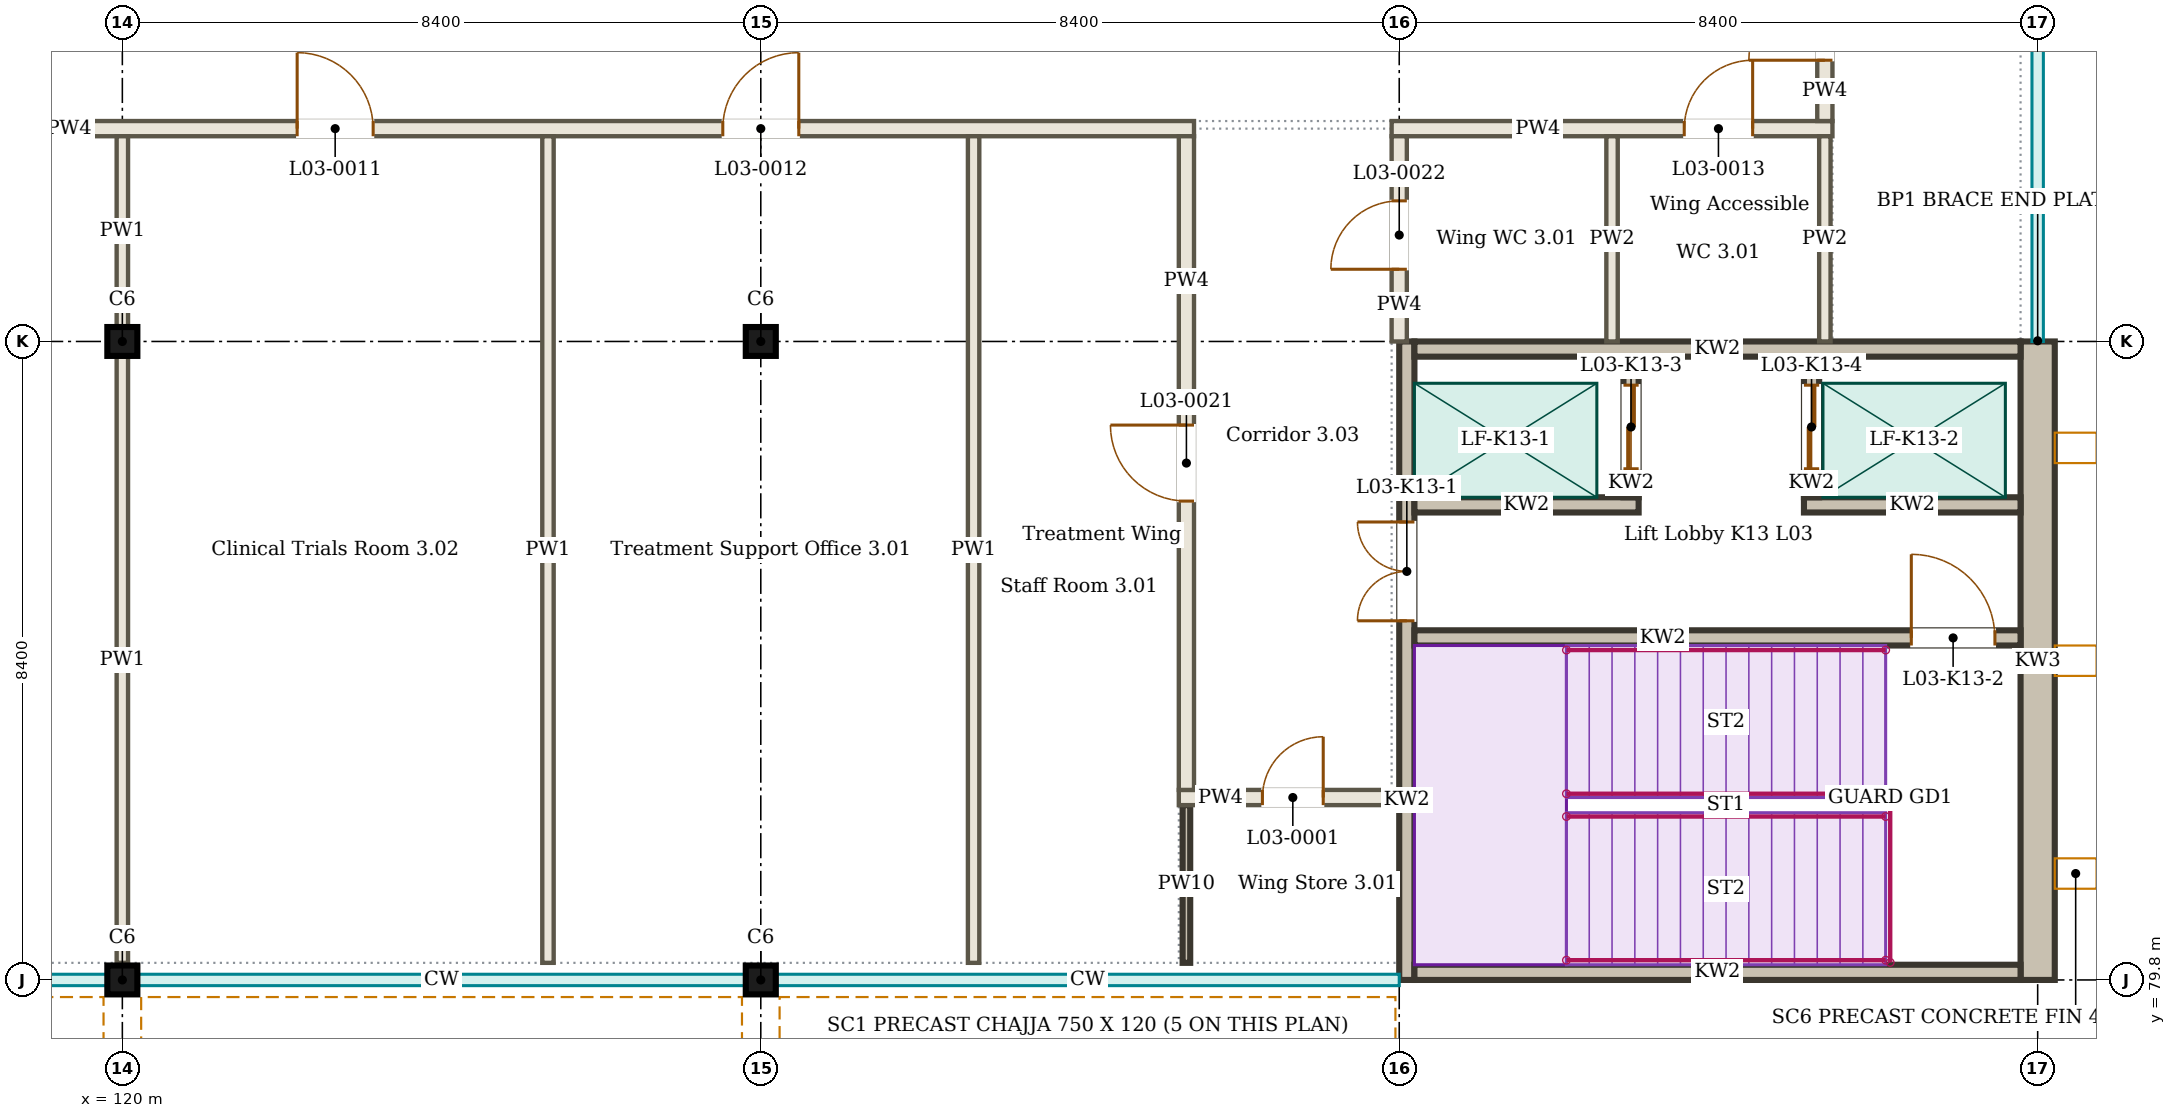
"""IFC4 building model, lengths in metres.
Left out: names, types, materials, properties, quantities, classifications, styles, units other than length and angle.
Written with IfcOpenShell. Run it as: python <this file> out.ifc"""

import sys

from ifc_helpers import new_model, si_unit, direction, frame, frame_2d, origin, origin_2d, place, context, subcontext, project, spatial, rectangle, i_section, extrude, element, fill, save


model = new_model("IFC4")
c1 = context("Model", 3, precision=1e-05, world=origin(), true_north=direction((0.0, 1.0)))
c2 = subcontext(c1, "Body", "Model", "MODEL_VIEW")
j1 = project(units=[si_unit("LENGTHUNIT", "METRE"), si_unit("PLANEANGLEUNIT", "RADIAN")], contexts=[c1])
p1 = place(None, origin())
s1 = spatial("IfcSite", under=j1, at=p1, CompositionType="ELEMENT")
p2 = place(p1, origin())
s2 = spatial("IfcBuilding", under=s1, at=p2, CompositionType="ELEMENT")
p3 = place(p2, frame((0.0, 0.0, 13.5)))
s3 = spatial("IfcBuildingStorey", under=s2, at=p3, CompositionType="ELEMENT", Elevation=13.5)
for number, where, z_axis, x_axis in (
    (1, (120.0, 79.8, 0.0), (0.0, 0.0, 1.0), (1.0, 0.0, 0.0)),
    (2, (128.4, 79.8, 0.0), (0.0, 0.0, 1.0), (1.0, 0.0, 0.0)),
    (3, (120.0, 88.2, 0.0), (0.0, 0.0, 1.0), (1.0, 0.0, 0.0)),
    (4, (128.4, 88.2, 0.0), (0.0, 0.0, 1.0), (1.0, 0.0, 0.0)),
):
    element("IfcColumn", number, at=place(p3, frame(where, z_axis=z_axis, x_axis=x_axis)), inside=s3, PredefinedType="COLUMN", context=c2, shape_type="SweptSolid", body=[
        extrude(i_section(OverallWidth=0.395, OverallDepth=0.38, WebThickness=0.019, FlangeThickness=0.03, FilletRadius=0.027, at=origin_2d()), origin(), (0.0, 0.0, 1.0), 4.5),
    ])
for number, where, z_axis, x_axis in (
    (5, (111.798, 79.64, 3.87), (0.0, 0.0, 1.0), (1.0, 0.0, 0.0)),
    (6, (120.198, 79.64, 3.87), (0.0, 0.0, 1.0), (1.0, 0.0, 0.0)),
):
    element("IfcWall", number, at=place(p3, frame(where, z_axis=z_axis, x_axis=x_axis)), inside=s3, PredefinedType="SOLIDWALL", context=c2, shape_type="SweptSolid", body=[
        extrude(rectangle(XDim=8.005, YDim=0.13, at=frame_2d((4.002, 0.0))), origin(), (0.0, 0.0, 1.0), 0.63),
    ])
p4 = place(p3, frame((128.597, 79.64, 3.87), z_axis=(0.0, 0.0, 1.0), x_axis=(1.0, 0.0, 0.0)))
e7 = element("IfcWall", 7, at=p4, inside=s3, PredefinedType="SOLIDWALL", context=c2, shape_type="SweptSolid", body=[
    extrude(rectangle(XDim=8.203, YDim=0.13, at=frame_2d((4.101, 0.0))), origin(), (0.0, 0.0, 1.0), 0.63),
])
p5 = place(p3, frame((133.9, 82.2, 0.0), z_axis=(0.0, 0.0, 1.0), x_axis=(1.0, 0.0, 0.0)))
e8 = element("IfcWall", 8, at=p5, inside=s3, PredefinedType="PARTITIONING", context=c2, shape_type="SweptSolid", body=[
    extrude(rectangle(XDim=2.9, YDim=0.2, at=frame_2d((1.45, 0.0))), origin(), (0.0, 0.0, 1.0), 3.95),
])
p6 = place(p5, frame((1.1, 0.0, 0.0)))
e9 = element("IfcOpeningElement", 9, at=p6, cuts=e8, PredefinedType="OPENING", context=c2, shape_type="SweptSolid", body=[
    extrude(rectangle(XDim=0.8, YDim=2.1, at=frame_2d((0.4, 1.05))), frame((0.0, 0.11, 0.0), z_axis=(0.0, -1.0, 0.0), x_axis=(1.0, 0.0, 0.0)), (0.0, 0.0, 1.0), 0.22),
])
p7 = place(p3, frame((111.825, 91.0, 0.0), z_axis=(0.0, 0.0, 1.0), x_axis=(1.0, 0.0, 0.0)))
e10 = element("IfcWall", 10, at=p7, inside=s3, PredefinedType="PARTITIONING", context=c2, shape_type="SweptSolid", body=[
    extrude(rectangle(XDim=22.275, YDim=0.2, at=frame_2d((11.138, 0.0))), origin(), (0.0, 0.0, 1.0), 3.8),
])
p8 = place(p7, frame((3.475, 0.0, 0.0)))
e11 = element("IfcOpeningElement", 11, at=p8, cuts=e10, PredefinedType="OPENING", context=c2, shape_type="SweptSolid", body=[
    extrude(rectangle(XDim=1.0, YDim=2.1, at=frame_2d((0.5, 1.05))), frame((0.0, 0.11, 0.0), z_axis=(0.0, -1.0, 0.0), x_axis=(1.0, 0.0, 0.0)), (0.0, 0.0, 1.0), 0.22),
])
p9 = place(p7, frame((10.475, 0.0, 0.0)))
e12 = element("IfcOpeningElement", 12, at=p9, cuts=e10, PredefinedType="OPENING", context=c2, shape_type="SweptSolid", body=[
    extrude(rectangle(XDim=1.0, YDim=2.1, at=frame_2d((0.5, 1.05))), frame((0.0, 0.11, 0.0), z_axis=(0.0, -1.0, 0.0), x_axis=(1.0, 0.0, 0.0)), (0.0, 0.0, 1.0), 0.22),
])
p10 = place(p7, frame((16.075, 0.0, 0.0)))
e13 = element("IfcOpeningElement", 13, at=p10, cuts=e10, PredefinedType="OPENING", context=c2, shape_type="SweptSolid", body=[
    extrude(rectangle(XDim=1.0, YDim=2.1, at=frame_2d((0.5, 1.05))), frame((0.0, 0.11, 0.0), z_axis=(0.0, -1.0, 0.0), x_axis=(1.0, 0.0, 0.0)), (0.0, 0.0, 1.0), 0.22),
])
p11 = place(p3, frame((136.7, 91.0, 0.0), z_axis=(0.0, 0.0, 1.0), x_axis=(1.0, 0.0, 0.0)))
e14 = element("IfcWall", 14, at=p11, inside=s3, PredefinedType="PARTITIONING", context=c2, shape_type="SweptSolid", body=[
    extrude(rectangle(XDim=5.8, YDim=0.2, at=frame_2d((2.9, 0.0))), origin(), (0.0, 0.0, 1.0), 3.8),
])
p12 = place(p11, frame((3.85, 0.0, 0.0)))
e15 = element("IfcOpeningElement", 15, at=p12, cuts=e14, PredefinedType="OPENING", context=c2, shape_type="SweptSolid", body=[
    extrude(rectangle(XDim=0.9, YDim=2.1, at=frame_2d((0.45, 1.05))), frame((0.0, 0.11, 0.0), z_axis=(0.0, -1.0, 0.0), x_axis=(1.0, 0.0, 0.0)), (0.0, 0.0, 1.0), 0.22),
])
p13 = place(p3, frame((120.0, 80.025, 0.0), z_axis=(0.0, 0.0, 1.0), x_axis=(0.0, 1.0, 0.0)))
e16 = element("IfcWall", 16, at=p13, inside=s3, PredefinedType="PARTITIONING", context=c2, shape_type="SweptSolid", body=[
    extrude(rectangle(XDim=7.978, YDim=0.15, at=frame_2d((3.989, 0.0))), origin(), (0.0, 0.0, 1.0), 3.8),
])
p14 = place(p3, frame((120.0, 88.397, 0.0), z_axis=(0.0, 0.0, 1.0), x_axis=(0.0, 1.0, 0.0)))
e17 = element("IfcWall", 17, at=p14, inside=s3, PredefinedType="PARTITIONING", context=c2, shape_type="SweptSolid", body=[
    extrude(rectangle(XDim=2.502, YDim=0.15, at=frame_2d((1.251, 0.0))), origin(), (0.0, 0.0, 1.0), 3.8),
])
for number, where, z_axis, x_axis in (
    (18, (125.6, 80.025, 0.0), (0.0, 0.0, 1.0), (0.0, 1.0, 0.0)),
    (19, (131.2, 80.025, 0.0), (0.0, 0.0, 1.0), (0.0, 1.0, 0.0)),
):
    element("IfcWall", number, at=place(p3, frame(where, z_axis=z_axis, x_axis=x_axis)), inside=s3, PredefinedType="PARTITIONING", context=c2, shape_type="SweptSolid", body=[
        extrude(rectangle(XDim=10.875, YDim=0.15, at=frame_2d((5.438, 0.0))), origin(), (0.0, 0.0, 1.0), 3.8),
    ])
p15 = place(p3, frame((134.0, 80.025, 0.0), z_axis=(0.0, 0.0, 1.0), x_axis=(0.0, 1.0, 0.0)))
e20 = element("IfcWall", 20, at=p15, inside=s3, PredefinedType="SOLIDWALL", context=c2, shape_type="SweptSolid", body=[
    extrude(rectangle(XDim=2.075, YDim=0.1, at=frame_2d((1.038, 0.0))), origin(), (0.0, 0.0, 1.0), 3.95),
])
p16 = place(p3, frame((134.0, 82.3, 0.0), z_axis=(0.0, 0.0, 1.0), x_axis=(0.0, 1.0, 0.0)))
e21 = element("IfcWall", 21, at=p16, inside=s3, PredefinedType="PARTITIONING", context=c2, shape_type="SweptSolid", body=[
    extrude(rectangle(XDim=8.6, YDim=0.2, at=frame_2d((4.3, 0.0))), origin(), (0.0, 0.0, 1.0), 3.8),
])
p17 = place(p16, frame((3.8, 0.0, 0.0)))
e22 = element("IfcOpeningElement", 22, at=p17, cuts=e21, PredefinedType="OPENING", context=c2, shape_type="SweptSolid", body=[
    extrude(rectangle(XDim=1.0, YDim=2.1, at=frame_2d((0.5, 1.05))), frame((0.0, 0.11, 0.0), z_axis=(0.0, -1.0, 0.0), x_axis=(1.0, 0.0, 0.0)), (0.0, 0.0, 1.0), 0.22),
])
p18 = place(p3, frame((136.8, 88.2, 0.0), z_axis=(0.0, 0.0, 1.0), x_axis=(0.0, 1.0, 0.0)))
e23 = element("IfcWall", 23, at=p18, inside=s3, PredefinedType="PARTITIONING", context=c2, shape_type="SweptSolid", body=[
    extrude(rectangle(XDim=2.7, YDim=0.2, at=frame_2d((1.35, 0.0))), origin(), (0.0, 0.0, 1.0), 3.8),
])
p19 = place(p18, frame((0.95, 0.0, 0.0)))
e24 = element("IfcOpeningElement", 24, at=p19, cuts=e23, PredefinedType="OPENING", context=c2, shape_type="SweptSolid", body=[
    extrude(rectangle(XDim=0.9, YDim=2.1, at=frame_2d((0.45, 1.05))), frame((0.0, 0.11, 0.0), z_axis=(0.0, -1.0, 0.0), x_axis=(1.0, 0.0, 0.0)), (0.0, 0.0, 1.0), 0.22),
])
for number, where, z_axis, x_axis in (
    (25, (139.6, 88.2, 0.0), (0.0, 0.0, 1.0), (0.0, 1.0, 0.0)),
    (26, (142.4, 88.2, 0.0), (0.0, 0.0, 1.0), (0.0, 1.0, 0.0)),
):
    element("IfcWall", number, at=place(p3, frame(where, z_axis=z_axis, x_axis=x_axis)), inside=s3, PredefinedType="PARTITIONING", context=c2, shape_type="SweptSolid", body=[
        extrude(rectangle(XDim=2.7, YDim=0.15, at=frame_2d((1.35, 0.0))), origin(), (0.0, 0.0, 1.0), 3.95),
    ])
p20 = place(p3, frame((142.4, 91.1, 0.0), z_axis=(0.0, 0.0, 1.0), x_axis=(0.0, 1.0, 0.0)))
e27 = element("IfcWall", 27, at=p20, inside=s3, PredefinedType="PARTITIONING", context=c2, shape_type="SweptSolid", body=[
    extrude(rectangle(XDim=2.6, YDim=0.2, at=frame_2d((1.3, 0.0))), origin(), (0.0, 0.0, 1.0), 3.95),
])
p21 = place(p20, frame((0.8, 0.0, 0.0)))
e28 = element("IfcOpeningElement", 28, at=p21, cuts=e27, PredefinedType="OPENING", context=c2, shape_type="SweptSolid", body=[
    extrude(rectangle(XDim=1.0, YDim=2.1, at=frame_2d((0.5, 1.05))), frame((0.0, 0.11, 0.0), z_axis=(0.0, -1.0, 0.0), x_axis=(1.0, 0.0, 0.0)), (0.0, 0.0, 1.0), 0.22),
])
p22 = place(p3, frame((136.9, 79.8, 0.0), z_axis=(0.0, 0.0, 1.0), x_axis=(0.0, 1.0, 0.0)))
e29 = element("IfcWall", 29, at=p22, inside=s3, PredefinedType="SOLIDWALL", context=c2, shape_type="SweptSolid", body=[
    extrude(rectangle(XDim=8.4, YDim=0.2, at=frame_2d((4.2, 0.0))), origin(), (0.0, 0.0, 1.0), 4.5),
])
p23 = place(p22, frame((4.725, 0.0, 0.0)))
e30 = element("IfcOpeningElement", 30, at=p23, cuts=e29, PredefinedType="OPENING", context=c2, shape_type="SweptSolid", body=[
    extrude(rectangle(XDim=1.3, YDim=2.1, at=frame_2d((0.65, 1.05))), frame((0.0, 0.11, 0.0), z_axis=(0.0, -1.0, 0.0), x_axis=(1.0, 0.0, 0.0)), (0.0, 0.0, 1.0), 0.22),
])
p24 = place(p3, frame((145.2, 79.8, 0.0), z_axis=(0.0, 0.0, 1.0), x_axis=(0.0, 1.0, 0.0)))
e31 = element("IfcWall", 31, at=p24, inside=s3, PredefinedType="SOLIDWALL", context=c2, shape_type="SweptSolid", body=[
    extrude(rectangle(XDim=8.4, YDim=0.45, at=frame_2d((4.2, 0.0))), origin(), (0.0, 0.0, 1.0), 4.5),
])
for number, where, z_axis, x_axis in (
    (32, (137.0, 79.9, 0.0), (0.0, 0.0, 1.0), (1.0, 0.0, 0.0)),
    (33, (137.0, 88.1, 0.0), (0.0, 0.0, 1.0), (1.0, 0.0, 0.0)),
):
    element("IfcWall", number, at=place(p3, frame(where, z_axis=z_axis, x_axis=x_axis)), inside=s3, PredefinedType="SOLIDWALL", context=c2, shape_type="SweptSolid", body=[
        extrude(rectangle(XDim=7.975, YDim=0.2, at=frame_2d((3.988, 0.0))), origin(), (0.0, 0.0, 1.0), 4.5),
    ])
p25 = place(p3, frame((137.0, 84.3, 0.0), z_axis=(0.0, 0.0, 1.0), x_axis=(1.0, 0.0, 0.0)))
e34 = element("IfcWall", 34, at=p25, inside=s3, PredefinedType="SOLIDWALL", context=c2, shape_type="SweptSolid", body=[
    extrude(rectangle(XDim=7.975, YDim=0.2, at=frame_2d((3.988, 0.0))), origin(), (0.0, 0.0, 1.0), 4.5),
])
p26 = place(p25, frame((6.538, 0.0, 0.0)))
e35 = element("IfcOpeningElement", 35, at=p26, cuts=e34, PredefinedType="OPENING", context=c2, shape_type="SweptSolid", body=[
    extrude(rectangle(XDim=1.1, YDim=2.1, at=frame_2d((0.55, 1.05))), frame((0.0, 0.11, 0.0), z_axis=(0.0, -1.0, 0.0), x_axis=(1.0, 0.0, 0.0)), (0.0, 0.0, 1.0), 0.22),
])
p27 = place(p3, frame((137.0, 86.05, 0.0), z_axis=(0.0, 0.0, 1.0), x_axis=(1.0, 0.0, 0.0)))
e36 = element("IfcWall", 36, at=p27, inside=s3, PredefinedType="SOLIDWALL", context=c2, shape_type="SweptSolid", body=[
    extrude(rectangle(XDim=2.95, YDim=0.2, at=frame_2d((1.475, 0.0))), origin(), (0.0, 0.0, 1.0), 4.5),
])
p28 = place(p3, frame((142.125, 86.05, 0.0), z_axis=(0.0, 0.0, 1.0), x_axis=(1.0, 0.0, 0.0)))
e37 = element("IfcWall", 37, at=p28, inside=s3, PredefinedType="SOLIDWALL", context=c2, shape_type="SweptSolid", body=[
    extrude(rectangle(XDim=2.85, YDim=0.2, at=frame_2d((1.425, 0.0))), origin(), (0.0, 0.0, 1.0), 4.5),
])
p29 = place(p3, frame((139.85, 86.15, 0.0), z_axis=(0.0, 0.0, 1.0), x_axis=(0.0, 1.0, 0.0)))
e38 = element("IfcWall", 38, at=p29, inside=s3, PredefinedType="SOLIDWALL", context=c2, shape_type="SweptSolid", body=[
    extrude(rectangle(XDim=1.85, YDim=0.2, at=frame_2d((0.925, 0.0))), origin(), (0.0, 0.0, 1.0), 4.5),
])
p30 = place(p29, frame((0.375, 0.0, 0.0)))
e39 = element("IfcOpeningElement", 39, at=p30, cuts=e38, PredefinedType="OPENING", context=c2, shape_type="SweptSolid", body=[
    extrude(rectangle(XDim=1.1, YDim=2.1, at=frame_2d((0.55, 1.05))), frame((0.0, 0.11, 0.0), z_axis=(0.0, -1.0, 0.0), x_axis=(1.0, 0.0, 0.0)), (0.0, 0.0, 1.0), 0.22),
])
p31 = place(p3, frame((142.225, 86.15, 0.0), z_axis=(0.0, 0.0, 1.0), x_axis=(0.0, 1.0, 0.0)))
e40 = element("IfcWall", 40, at=p31, inside=s3, PredefinedType="SOLIDWALL", context=c2, shape_type="SweptSolid", body=[
    extrude(rectangle(XDim=1.85, YDim=0.2, at=frame_2d((0.925, 0.0))), origin(), (0.0, 0.0, 1.0), 4.5),
])
p32 = place(p31, frame((0.375, 0.0, 0.0)))
e41 = element("IfcOpeningElement", 41, at=p32, cuts=e40, PredefinedType="OPENING", context=c2, shape_type="SweptSolid", body=[
    extrude(rectangle(XDim=1.1, YDim=2.1, at=frame_2d((0.55, 1.05))), frame((0.0, 0.11, 0.0), z_axis=(0.0, -1.0, 0.0), x_axis=(1.0, 0.0, 0.0)), (0.0, 0.0, 1.0), 0.22),
])
p33 = place(p6, origin())
e42 = element("IfcDoor", 42, at=p33, inside=s3, OperationType="SINGLE_SWING_RIGHT", PredefinedType="DOOR", context=c2, shape_type="SweptSolid", body=[
    extrude(rectangle(XDim=0.8, YDim=2.1, at=frame_2d((0.4, 1.05))), frame((0.0, 0.025, 0.0), z_axis=(0.0, -1.0, 0.0), x_axis=(1.0, 0.0, 0.0)), (0.0, 0.0, 1.0), 0.05),
])
fill(e9, e42)
p34 = place(p9, origin())
e43 = element("IfcDoor", 43, at=p34, inside=s3, OperationType="SINGLE_SWING_LEFT", PredefinedType="DOOR", context=c2, shape_type="SweptSolid", body=[
    extrude(rectangle(XDim=1.0, YDim=2.1, at=frame_2d((0.5, 1.05))), frame((0.0, 0.025, 0.0), z_axis=(0.0, -1.0, 0.0), x_axis=(1.0, 0.0, 0.0)), (0.0, 0.0, 1.0), 0.05),
])
fill(e12, e43)
p35 = place(p10, origin())
e44 = element("IfcDoor", 44, at=p35, inside=s3, OperationType="SINGLE_SWING_RIGHT", PredefinedType="DOOR", context=c2, shape_type="SweptSolid", body=[
    extrude(rectangle(XDim=1.0, YDim=2.1, at=frame_2d((0.5, 1.05))), frame((0.0, 0.025, 0.0), z_axis=(0.0, -1.0, 0.0), x_axis=(1.0, 0.0, 0.0)), (0.0, 0.0, 1.0), 0.05),
])
fill(e13, e44)
p36 = place(p12, origin())
e45 = element("IfcDoor", 45, at=p36, inside=s3, OperationType="SINGLE_SWING_RIGHT", PredefinedType="DOOR", context=c2, shape_type="SweptSolid", body=[
    extrude(rectangle(XDim=0.9, YDim=2.1, at=frame_2d((0.45, 1.05))), frame((0.0, 0.025, 0.0), z_axis=(0.0, -1.0, 0.0), x_axis=(1.0, 0.0, 0.0)), (0.0, 0.0, 1.0), 0.05),
])
fill(e15, e45)
p37 = place(p17, origin())
e46 = element("IfcDoor", 46, at=p37, inside=s3, OperationType="SINGLE_SWING_RIGHT", PredefinedType="DOOR", context=c2, shape_type="SweptSolid", body=[
    extrude(rectangle(XDim=1.0, YDim=2.1, at=frame_2d((0.5, 1.05))), frame((0.0, 0.025, 0.0), z_axis=(0.0, -1.0, 0.0), x_axis=(1.0, 0.0, 0.0)), (0.0, 0.0, 1.0), 0.05),
])
fill(e22, e46)
p38 = place(p19, origin())
e47 = element("IfcDoor", 47, at=p38, inside=s3, OperationType="SINGLE_SWING_LEFT", PredefinedType="DOOR", context=c2, shape_type="SweptSolid", body=[
    extrude(rectangle(XDim=0.9, YDim=2.1, at=frame_2d((0.45, 1.05))), frame((0.0, 0.025, 0.0), z_axis=(0.0, -1.0, 0.0), x_axis=(1.0, 0.0, 0.0)), (0.0, 0.0, 1.0), 0.05),
])
fill(e24, e47)
p39 = place(p21, origin())
e48 = element("IfcDoor", 48, at=p39, inside=s3, OperationType="SINGLE_SWING_LEFT", PredefinedType="DOOR", context=c2, shape_type="SweptSolid", body=[
    extrude(rectangle(XDim=1.0, YDim=2.1, at=frame_2d((0.5, 1.05))), frame((0.0, 0.025, 0.0), z_axis=(0.0, -1.0, 0.0), x_axis=(1.0, 0.0, 0.0)), (0.0, 0.0, 1.0), 0.05),
])
fill(e28, e48)
p40 = place(p23, origin())
e49 = element("IfcDoor", 49, at=p40, inside=s3, OperationType="DOUBLE_DOOR_DOUBLE_SWING", PredefinedType="DOOR", context=c2, shape_type="SweptSolid", body=[
    extrude(rectangle(XDim=1.3, YDim=2.1, at=frame_2d((0.65, 1.05))), frame((0.0, 0.025, 0.0), z_axis=(0.0, -1.0, 0.0), x_axis=(1.0, 0.0, 0.0)), (0.0, 0.0, 1.0), 0.05),
])
fill(e30, e49)
p41 = place(p26, origin())
e50 = element("IfcDoor", 50, at=p41, inside=s3, OperationType="SINGLE_SWING_LEFT", PredefinedType="DOOR", context=c2, shape_type="SweptSolid", body=[
    extrude(rectangle(XDim=1.1, YDim=2.1, at=frame_2d((0.55, 1.05))), frame((0.0, 0.025, 0.0), z_axis=(0.0, -1.0, 0.0), x_axis=(1.0, 0.0, 0.0)), (0.0, 0.0, 1.0), 0.05),
])
fill(e35, e50)
p42 = place(p30, origin())
e51 = element("IfcDoor", 51, at=p42, inside=s3, OperationType="DOUBLE_DOOR_SLIDING", PredefinedType="DOOR", context=c2, shape_type="SweptSolid", body=[
    extrude(rectangle(XDim=1.1, YDim=2.1, at=frame_2d((0.55, 1.05))), frame((0.0, 0.025, 0.0), z_axis=(0.0, -1.0, 0.0), x_axis=(1.0, 0.0, 0.0)), (0.0, 0.0, 1.0), 0.05),
])
fill(e39, e51)
p43 = place(p32, origin())
e52 = element("IfcDoor", 52, at=p43, inside=s3, OperationType="DOUBLE_DOOR_SLIDING", PredefinedType="DOOR", context=c2, shape_type="SweptSolid", body=[
    extrude(rectangle(XDim=1.1, YDim=2.1, at=frame_2d((0.55, 1.05))), frame((0.0, 0.025, 0.0), z_axis=(0.0, -1.0, 0.0), x_axis=(1.0, 0.0, 0.0)), (0.0, 0.0, 1.0), 0.05),
])
fill(e41, e52)
save(model, sys.argv[1])
